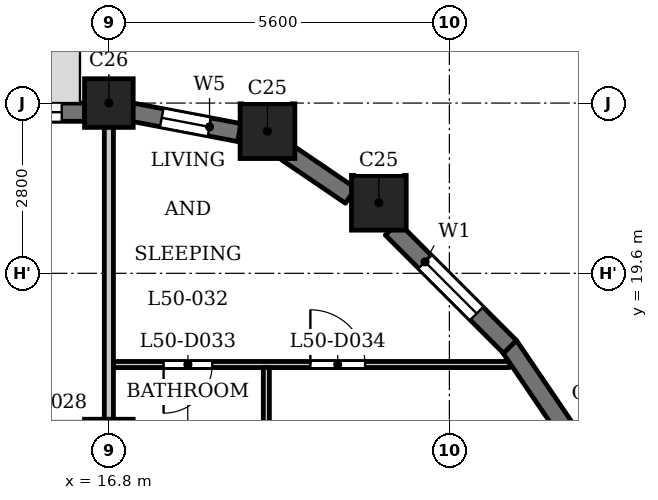
"""IFC4 building model, lengths in metres.
Left out: names, types, materials, properties, quantities, classifications, styles, units other than length and angle.
Written with IfcOpenShell. Run it as: python <this file> out.ifc"""

import sys

from ifc_helpers import new_model, si_unit, direction, frame, frame_2d, origin, origin_2d, place, context, subcontext, project, spatial, rectangle, extrude, element, fill, save


model = new_model("IFC4")
c1 = context("Model", 3, precision=1e-05, world=origin(), true_north=direction((0.0, 1.0)))
c2 = subcontext(c1, "Body", "Model", "MODEL_VIEW")
j1 = project(units=[si_unit("LENGTHUNIT", "METRE"), si_unit("PLANEANGLEUNIT", "RADIAN")], contexts=[c1])
p1 = place(None, origin())
s1 = spatial("IfcSite", under=j1, at=p1, CompositionType="ELEMENT")
p2 = place(p1, origin())
s2 = spatial("IfcBuilding", under=s1, at=p2, CompositionType="ELEMENT")
p3 = place(p2, frame((0.0, 0.0, 195.9)))
s3 = spatial("IfcBuildingStorey", under=s2, at=p3, CompositionType="ELEMENT", Elevation=195.9)
for number, where, z_axis, x_axis in (
    (1, (21.24, 20.76, 0.0), (0.0, 0.0, 1.0), (1.0, 0.0, 0.0)),
    (2, (19.409, 21.938, 0.0), (0.0, 0.0, 1.0), (1.0, 0.0, 0.0)),
):
    element("IfcColumn", number, at=place(p3, frame(where, z_axis=z_axis, x_axis=x_axis)), inside=s3, PredefinedType="COLUMN", context=c2, shape_type="SweptSolid", body=[
        extrude(rectangle(XDim=0.9, YDim=0.9, at=origin_2d()), origin(), (0.0, 0.0, 1.0), 3.5),
    ])
for number, where, z_axis, x_axis in (
    (3, (16.8, 16.8, 0.0), (0.0, 0.0, 1.0), (1.0, 0.0, 0.0)),
    (4, (16.8, 22.4, 0.0), (0.0, 0.0, 1.0), (1.0, 0.0, 0.0)),
):
    element("IfcColumn", number, at=place(p3, frame(where, z_axis=z_axis, x_axis=x_axis)), inside=s3, PredefinedType="COLUMN", context=c2, shape_type="SweptSolid", body=[
        extrude(rectangle(XDim=0.8, YDim=0.8, at=origin_2d()), origin(), (0.0, 0.0, 1.0), 3.5),
    ])
p4 = place(p3, frame((24.394, 16.919, 0.0), z_axis=(0.0, 0.0, 1.0), x_axis=(-0.562040093569, 0.827109988588, 0.0)))
e5 = element("IfcWall", 5, at=p4, inside=s3, PredefinedType="SOLIDWALL", context=c2, shape_type="SweptSolid", body=[
    extrude(rectangle(XDim=1.806, YDim=0.3, at=frame_2d((0.903, 0.0))), origin(), (0.0, 0.0, 1.0), 2.5),
])
p5 = place(p3, frame((23.397, 18.391, 0.0), z_axis=(0.0, 0.0, 1.0), x_axis=(-0.707106781187, 0.707106781187, 0.0)))
e6 = element("IfcWall", 6, at=p5, inside=s3, PredefinedType="SOLIDWALL", context=c2, shape_type="SweptSolid", body=[
    extrude(rectangle(XDim=2.75, YDim=0.3, at=frame_2d((1.375, 0.0))), origin(), (0.0, 0.0, 1.0), 2.5),
])
p6 = place(p5, frame((0.775, 0.0, 0.6)))
e7 = element("IfcOpeningElement", 7, at=p6, cuts=e6, PredefinedType="OPENING", context=c2, shape_type="SweptSolid", body=[
    extrude(rectangle(XDim=1.2, YDim=1.55, at=frame_2d((0.6, 0.775))), frame((0.0, 0.16, 0.0), z_axis=(0.0, -1.0, 0.0), x_axis=(1.0, 0.0, 0.0)), (0.0, 0.0, 1.0), 0.32),
])
p7 = place(p3, frame((20.775, 20.876, 0.0), z_axis=(0.0, 0.0, 1.0), x_axis=(-0.827075824828, 0.562090366388, 0.0)))
e8 = element("IfcWall", 8, at=p7, inside=s3, PredefinedType="SOLIDWALL", context=c2, shape_type="SweptSolid", body=[
    extrude(rectangle(XDim=1.277, YDim=0.3, at=frame_2d((0.638, 0.0))), origin(), (0.0, 0.0, 1.0), 2.5),
])
p8 = place(p3, frame((18.946, 21.914, 0.0), z_axis=(0.0, 0.0, 1.0), x_axis=(-0.98230529033, 0.187286722942, 0.0)))
e9 = element("IfcWall", 9, at=p8, inside=s3, PredefinedType="SOLIDWALL", context=c2, shape_type="SweptSolid", body=[
    extrude(rectangle(XDim=1.799, YDim=0.3, at=frame_2d((0.899, 0.0))), origin(), (0.0, 0.0, 1.0), 2.5),
])
p9 = place(p8, frame((0.5, 0.0, 0.6)))
e10 = element("IfcOpeningElement", 10, at=p9, cuts=e9, PredefinedType="OPENING", context=c2, shape_type="SweptSolid", body=[
    extrude(rectangle(XDim=0.8, YDim=1.55, at=frame_2d((0.4, 0.775))), frame((0.0, 0.16, 0.0), z_axis=(0.0, -1.0, 0.0), x_axis=(1.0, 0.0, 0.0)), (0.0, 0.0, 1.0), 0.32),
])
p10 = place(p3, frame((16.4, 22.25, 0.0), z_axis=(0.0, 0.0, 1.0), x_axis=(-1.0, 0.0, 0.0)))
e11 = element("IfcWall", 11, at=p10, inside=s3, PredefinedType="SOLIDWALL", context=c2, shape_type="SweptSolid", body=[
    extrude(rectangle(XDim=1.95, YDim=0.3, at=frame_2d((0.975, 0.0))), origin(), (0.0, 0.0, 1.0), 2.5),
])
p11 = place(p10, frame((0.375, 0.0, 0.6)))
e12 = element("IfcOpeningElement", 12, at=p11, cuts=e11, PredefinedType="OPENING", context=c2, shape_type="SweptSolid", body=[
    extrude(rectangle(XDim=1.2, YDim=1.55, at=frame_2d((0.6, 0.775))), frame((0.0, 0.16, 0.0), z_axis=(0.0, -1.0, 0.0), x_axis=(1.0, 0.0, 0.0)), (0.0, 0.0, 1.0), 0.32),
])
p12 = place(p3, frame((16.875, 18.1, 0.0), z_axis=(0.0, 0.0, 1.0), x_axis=(1.0, 0.0, 0.0)))
e13 = element("IfcWall", 13, at=p12, inside=s3, PredefinedType="PARTITIONING", context=c2, shape_type="SweptSolid", body=[
    extrude(rectangle(XDim=6.515, YDim=0.1, at=frame_2d((3.258, 0.0))), origin(), (0.0, 0.0, 1.0), 3.2),
])
p13 = place(p12, frame((0.825, 0.0, 0.0)))
e14 = element("IfcOpeningElement", 14, at=p13, cuts=e13, PredefinedType="OPENING", context=c2, shape_type="SweptSolid", body=[
    extrude(rectangle(XDim=0.8, YDim=2.1, at=frame_2d((0.4, 1.05))), frame((0.0, 0.06, 0.0), z_axis=(0.0, -1.0, 0.0), x_axis=(1.0, 0.0, 0.0)), (0.0, 0.0, 1.0), 0.12),
])
p14 = place(p12, frame((3.239, 0.0, 0.0)))
e15 = element("IfcOpeningElement", 15, at=p14, cuts=e13, PredefinedType="OPENING", context=c2, shape_type="SweptSolid", body=[
    extrude(rectangle(XDim=0.9, YDim=2.1, at=frame_2d((0.45, 1.05))), frame((0.0, 0.06, 0.0), z_axis=(0.0, -1.0, 0.0), x_axis=(1.0, 0.0, 0.0)), (0.0, 0.0, 1.0), 0.12),
])
p15 = place(p3, frame((16.8, 15.475, 0.0), z_axis=(0.0, 0.0, 1.0), x_axis=(0.0, 1.0, 0.0)))
e16 = element("IfcWall", 16, at=p15, inside=s3, PredefinedType="PARTITIONING", context=c2, shape_type="SweptSolid", body=[
    extrude(rectangle(XDim=6.835, YDim=0.15, at=frame_2d((3.417, 0.0))), origin(), (0.0, 0.0, 1.0), 2.55),
])
p16 = place(p3, frame((19.39, 15.475, 0.0), z_axis=(0.0, 0.0, 1.0), x_axis=(0.0, 1.0, 0.0)))
e17 = element("IfcWall", 17, at=p16, inside=s3, PredefinedType="PARTITIONING", context=c2, shape_type="SweptSolid", body=[
    extrude(rectangle(XDim=2.575, YDim=0.1, at=frame_2d((1.288, 0.0))), origin(), (0.0, 0.0, 1.0), 3.2),
])
p17 = place(p13, origin())
e18 = element("IfcDoor", 18, at=p17, inside=s3, OperationType="SINGLE_SWING_LEFT", PredefinedType="DOOR", context=c2, shape_type="SweptSolid", body=[
    extrude(rectangle(XDim=0.8, YDim=2.1, at=frame_2d((0.4, 1.05))), frame((0.0, 0.025, 0.0), z_axis=(0.0, -1.0, 0.0), x_axis=(1.0, 0.0, 0.0)), (0.0, 0.0, 1.0), 0.05),
])
fill(e14, e18)
p18 = place(p14, origin())
e19 = element("IfcDoor", 19, at=p18, inside=s3, OperationType="SINGLE_SWING_RIGHT", PredefinedType="DOOR", context=c2, shape_type="SweptSolid", body=[
    extrude(rectangle(XDim=0.9, YDim=2.1, at=frame_2d((0.45, 1.05))), frame((0.0, 0.025, 0.0), z_axis=(0.0, -1.0, 0.0), x_axis=(1.0, 0.0, 0.0)), (0.0, 0.0, 1.0), 0.05),
])
fill(e15, e19)
p19 = place(p6, origin())
e20 = element("IfcWindow", 20, at=p19, inside=s3, PartitioningType="SINGLE_PANEL", PredefinedType="WINDOW", context=c2, shape_type="SweptSolid", body=[
    extrude(rectangle(XDim=1.2, YDim=1.55, at=frame_2d((0.6, 0.775))), frame((0.0, 0.03, 0.0), z_axis=(0.0, -1.0, 0.0), x_axis=(1.0, 0.0, 0.0)), (0.0, 0.0, 1.0), 0.06),
])
fill(e7, e20)
p20 = place(p9, origin())
e21 = element("IfcWindow", 21, at=p20, inside=s3, PartitioningType="SINGLE_PANEL", PredefinedType="WINDOW", context=c2, shape_type="SweptSolid", body=[
    extrude(rectangle(XDim=0.8, YDim=1.55, at=frame_2d((0.4, 0.775))), frame((0.0, 0.03, 0.0), z_axis=(0.0, -1.0, 0.0), x_axis=(1.0, 0.0, 0.0)), (0.0, 0.0, 1.0), 0.06),
])
fill(e10, e21)
p21 = place(p11, origin())
e22 = element("IfcWindow", 22, at=p21, inside=s3, PartitioningType="SINGLE_PANEL", PredefinedType="WINDOW", context=c2, shape_type="SweptSolid", body=[
    extrude(rectangle(XDim=1.2, YDim=1.55, at=frame_2d((0.6, 0.775))), frame((0.0, 0.03, 0.0), z_axis=(0.0, -1.0, 0.0), x_axis=(1.0, 0.0, 0.0)), (0.0, 0.0, 1.0), 0.06),
])
fill(e12, e22)
save(model, sys.argv[1])
